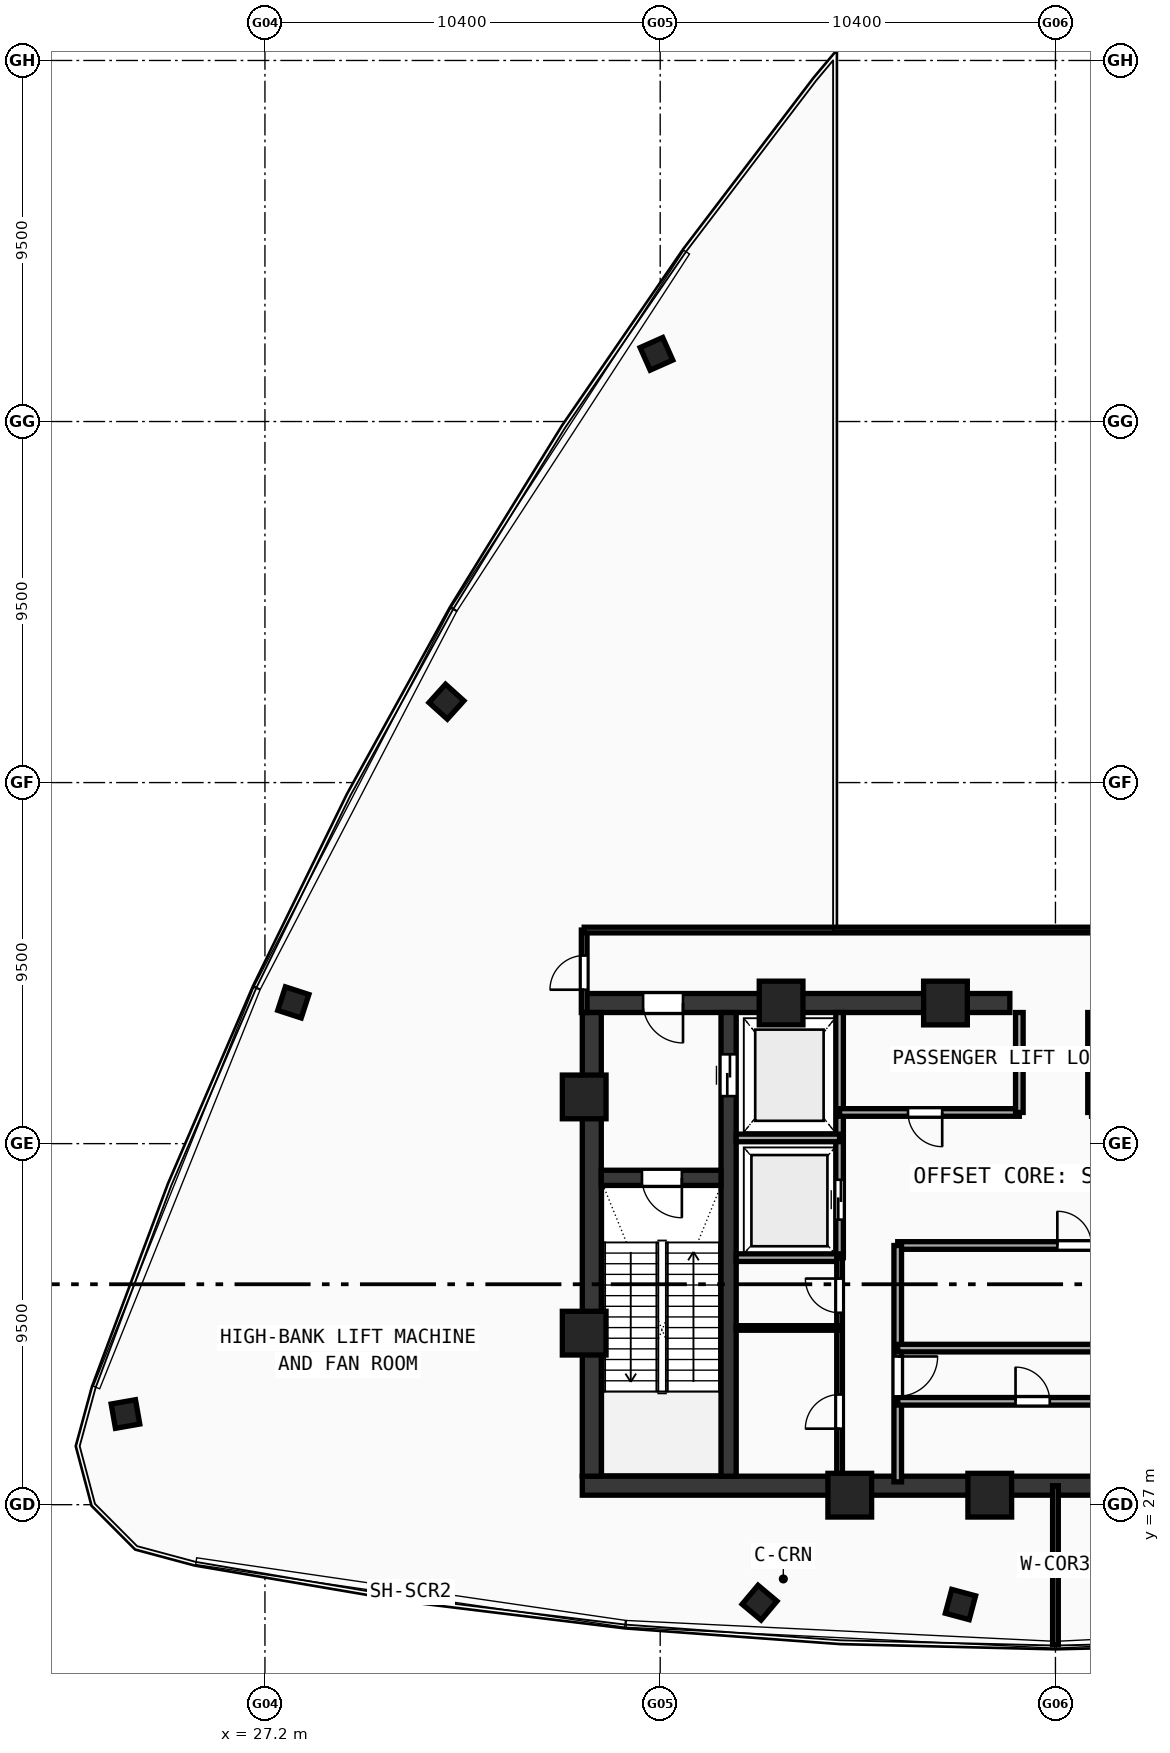
"""IFC4 building model, lengths in metres.
Left out: names, types, materials, properties, quantities, classifications, styles, units other than length and angle.
Written with IfcOpenShell. Run it as: python <this file> out.ifc"""

import sys

from ifc_helpers import new_model, si_unit, direction, frame, frame_2d, origin, origin_with_axes, origin_2d, place, context, subcontext, project, spatial, rectangle, hollow_rectangle, extrude, source, transform, mapped, element, fill, save


model = new_model("IFC4")
c1 = context("Model", 3, precision=1e-05, world=origin(), true_north=direction((0.0, 1.0)))
c2 = subcontext(c1, "Body", "Model", "MODEL_VIEW")
j1 = project(units=[si_unit("LENGTHUNIT", "METRE"), si_unit("PLANEANGLEUNIT", "RADIAN")], contexts=[c1])
p1 = place(None, origin())
s1 = spatial("IfcSite", under=j1, at=p1, CompositionType="ELEMENT")
p2 = place(p1, origin())
s2 = spatial("IfcBuilding", under=s1, at=p2, CompositionType="ELEMENT")
p3 = place(p2, frame((0.0, 0.0, 376.76)))
s3 = spatial("IfcBuildingStorey", under=s2, at=p3, CompositionType="ELEMENT", Elevation=376.76)
p4 = place(p3, frame((35.55, 27.5, 0.0), z_axis=(0.0, 0.0, 1.0), x_axis=(1.0, 0.0, 0.0)))
e1 = element("IfcWall", 1, at=p4, inside=s3, PredefinedType="SHEAR", context=c2, shape_type="SweptSolid", body=[
    extrude(rectangle(XDim=24.9, YDim=0.5, at=frame_2d((12.45, 0.0))), origin(), (0.0, 0.0, 1.0), 4.72),
])
p5 = place(p3, frame((35.55, 40.2, 0.0), z_axis=(0.0, 0.0, 1.0), x_axis=(1.0, 0.0, 0.0)))
e2 = element("IfcWall", 2, at=p5, inside=s3, PredefinedType="SHEAR", context=c2, shape_type="SweptSolid", body=[
    extrude(rectangle(XDim=11.25, YDim=0.5, at=frame_2d((5.625, 0.0))), origin(), (0.0, 0.0, 1.0), 4.72),
])
p6 = place(p5, frame((1.6, 0.0, 0.0)))
e3 = element("IfcOpeningElement", 3, at=p6, cuts=e2, PredefinedType="OPENING", context=c2, shape_type="SweptSolid", body=[
    extrude(rectangle(XDim=1.05, YDim=2.1, at=frame_2d((0.525, 1.05))), frame((0.0, 0.26, 0.0), z_axis=(0.0, -1.0, 0.0), x_axis=(1.0, 0.0, 0.0)), (0.0, 0.0, 1.0), 0.52),
])
p7 = place(p3, frame((35.8, 27.75, 0.0), z_axis=(0.0, 0.0, 1.0), x_axis=(0.0, 1.0, 0.0)))
e4 = element("IfcWall", 4, at=p7, inside=s3, PredefinedType="SHEAR", context=c2, shape_type="SweptSolid", body=[
    extrude(rectangle(XDim=12.2, YDim=0.5, at=frame_2d((6.1, 0.0))), origin(), (0.0, 0.0, 1.0), 4.72),
])
p8 = place(p3, frame((39.4, 27.75, 0.0), z_axis=(0.0, 0.0, 1.0), x_axis=(0.0, 1.0, 0.0)))
e5 = element("IfcWall", 5, at=p8, inside=s3, PredefinedType="SHEAR", context=c2, shape_type="SweptSolid", body=[
    extrude(rectangle(XDim=12.2, YDim=0.4, at=frame_2d((6.1, 0.0))), origin(), (0.0, 0.0, 1.0), 4.72),
])
p9 = place(p8, frame((10.0, 0.0, 0.0)))
e6 = element("IfcOpeningElement", 6, at=p9, cuts=e5, PredefinedType="OPENING", context=c2, shape_type="SweptSolid", body=[
    extrude(rectangle(XDim=1.1, YDim=2.1, at=frame_2d((0.55, 1.05))), frame((0.0, 0.21, 0.0), z_axis=(0.0, -1.0, 0.0), x_axis=(1.0, 0.0, 0.0)), (0.0, 0.0, 1.0), 0.42),
])
p10 = place(p3, frame((36.05, 35.6, 0.0), z_axis=(0.0, 0.0, 1.0), x_axis=(1.0, 0.0, 0.0)))
e7 = element("IfcWall", 7, at=p10, inside=s3, PredefinedType="SHEAR", context=c2, shape_type="SweptSolid", body=[
    extrude(rectangle(XDim=3.15, YDim=0.4, at=frame_2d((1.575, 0.0))), origin(), (0.0, 0.0, 1.0), 4.72),
])
p11 = place(p10, frame((1.07, 0.0, 0.0)))
e8 = element("IfcOpeningElement", 8, at=p11, cuts=e7, PredefinedType="OPENING", context=c2, shape_type="SweptSolid", body=[
    extrude(rectangle(XDim=1.05, YDim=2.1, at=frame_2d((0.525, 1.05))), frame((0.0, 0.21, 0.0), z_axis=(0.0, -1.0, 0.0), x_axis=(1.0, 0.0, 0.0)), (0.0, 0.0, 1.0), 0.42),
])
m1 = source(origin(), c2, "Body", "SweptSolid", [
    extrude(hollow_rectangle(XDim=1.15, YDim=1.15, WallThickness=0.048, at=origin_2d()), origin(), (0.0, 0.0, 1.0), 5.0),
])
for number, where, z_axis, x_axis in (
    (9, (42.588, 27.25, -0.28), (0.0, 0.0, 1.0), (1.0, 0.0, 0.0)),
    (10, (46.272, 27.25, -0.28), (0.0, 0.0, 1.0), (1.0, 0.0, 0.0)),
    (11, (45.106, 40.2, -0.28), (0.0, 0.0, 1.0), (1.0, 0.0, 0.0)),
    (12, (40.781, 40.2, -0.28), (0.0, 0.0, 1.0), (1.0, 0.0, 0.0)),
    (13, (35.6, 37.729, -0.28), (0.0, 0.0, 1.0), (1.0, 0.0, 0.0)),
    (14, (35.6, 31.513, -0.28), (0.0, 0.0, 1.0), (1.0, 0.0, 0.0)),
):
    element("IfcColumn", number, at=place(p3, frame(where, z_axis=z_axis, x_axis=x_axis)), inside=s3, PredefinedType="COLUMN", context=c2, shape_type="MappedRepresentation", body=[
        mapped(m1, transform((0.0, 0.0, 0.0), scale=1.0)),
    ])
m2 = source(origin(), c2, "Body", "SweptSolid", [
    extrude(hollow_rectangle(XDim=0.65, YDim=0.65, WallThickness=0.024, at=origin_2d()), origin(), (0.0, 0.0, 1.0), 5.0),
])
for number, where, z_axis, x_axis in (
    (15, (40.215, 24.422, -0.28), (0.0, 0.0, 1.0), (0.766, -0.643, 0.0)),
    (16, (45.501, 24.373, -0.28), (0.0, 0.0, 1.0), (0.966, -0.259, 0.0)),
    (17, (37.501, 57.281, -0.28), (0.0, 0.0, 1.0), (-0.914, -0.407, 0.0)),
    (18, (31.975, 48.129, -0.28), (0.0, 0.0, 1.0), (-0.669, -0.743, 0.0)),
    (19, (27.947, 40.216, -0.28), (0.0, 0.0, 1.0), (-0.309, -0.951, 0.0)),
    (20, (23.53, 29.385, -0.28), (0.0, 0.0, 1.0), (0.174, -0.985, 0.0)),
):
    element("IfcColumn", number, at=place(p3, frame(where, z_axis=z_axis, x_axis=x_axis)), inside=s3, PredefinedType="COLUMN", context=c2, shape_type="MappedRepresentation", body=[
        mapped(m2, transform((0.0, 0.0, 0.0), scale=1.0)),
    ])
p12 = place(p3, frame((42.32, 33.5, 0.0), z_axis=(0.0, 0.0, 1.0), x_axis=(0.0, 1.0, 0.0)))
e21 = element("IfcWall", 21, at=p12, inside=s3, PredefinedType="SOLIDWALL", context=c2, shape_type="SweptSolid", body=[
    extrude(rectangle(XDim=6.45, YDim=0.2, at=frame_2d((3.225, 0.0))), origin(), (0.0, 0.0, 1.0), 4.72),
])
p13 = place(p12, frame((1.0, 0.0, 0.0)))
e22 = element("IfcOpeningElement", 22, at=p13, cuts=e21, PredefinedType="OPENING", context=c2, shape_type="SweptSolid", body=[
    extrude(rectangle(XDim=1.05, YDim=2.1, at=frame_2d((0.525, 1.05))), frame((0.0, 0.11, 0.0), z_axis=(0.0, -1.0, 0.0), x_axis=(1.0, 0.0, 0.0)), (0.0, 0.0, 1.0), 0.22),
])
for number, where, z_axis, x_axis in (
    (23, (39.6, 36.65, 0.0), (0.0, 0.0, 1.0), (1.0, 0.0, 0.0)),
    (24, (39.6, 33.5, 0.0), (0.0, 0.0, 1.0), (1.0, 0.0, 0.0)),
):
    element("IfcWall", number, at=place(p3, frame(where, z_axis=z_axis, x_axis=x_axis)), inside=s3, PredefinedType="SOLIDWALL", context=c2, shape_type="SweptSolid", body=[
        extrude(rectangle(XDim=2.72, YDim=0.2, at=frame_2d((1.36, 0.0))), origin(), (0.0, 0.0, 1.0), 4.72),
    ])
p14 = place(p3, frame((42.32, 37.32, 0.0), z_axis=(0.0, 0.0, 1.0), x_axis=(1.0, 0.0, 0.0)))
e25 = element("IfcWall", 25, at=p14, inside=s3, PredefinedType="SOLIDWALL", context=c2, shape_type="SweptSolid", body=[
    extrude(rectangle(XDim=4.73, YDim=0.2, at=frame_2d((2.365, 0.0))), origin(), (0.0, 0.0, 1.0), 4.72),
])
p15 = place(p14, frame((1.8, 0.0, 0.0)))
e26 = element("IfcOpeningElement", 26, at=p15, cuts=e25, PredefinedType="OPENING", context=c2, shape_type="SweptSolid", body=[
    extrude(rectangle(XDim=0.9, YDim=2.1, at=frame_2d((0.45, 1.05))), frame((0.0, 0.11, 0.0), z_axis=(0.0, -1.0, 0.0), x_axis=(1.0, 0.0, 0.0)), (0.0, 0.0, 1.0), 0.22),
])
for number, where, z_axis, x_axis in (
    (27, (47.05, 37.32, 0.0), (0.0, 0.0, 1.0), (0.0, 1.0, 0.0)),
    (28, (48.95, 37.32, 0.0), (0.0, 0.0, 1.0), (0.0, 1.0, 0.0)),
):
    element("IfcWall", number, at=place(p3, frame(where, z_axis=z_axis, x_axis=x_axis)), inside=s3, PredefinedType="SOLIDWALL", context=c2, shape_type="SweptSolid", body=[
        extrude(rectangle(XDim=2.63, YDim=0.2, at=frame_2d((1.315, 0.0))), origin(), (0.0, 0.0, 1.0), 4.72),
    ])
p16 = place(p3, frame((43.85, 33.82, 0.0), z_axis=(0.0, 0.0, 1.0), x_axis=(1.0, 0.0, 0.0)))
e29 = element("IfcWall", 29, at=p16, inside=s3, PredefinedType="SOLIDWALL", context=c2, shape_type="SweptSolid", body=[
    extrude(rectangle(XDim=9.83, YDim=0.2, at=frame_2d((4.915, 0.0))), origin(), (0.0, 0.0, 1.0), 4.72),
])
p17 = place(p16, frame((4.2, 0.0, 0.0)))
e30 = element("IfcOpeningElement", 30, at=p17, cuts=e29, PredefinedType="OPENING", context=c2, shape_type="SweptSolid", body=[
    extrude(rectangle(XDim=0.9, YDim=2.1, at=frame_2d((0.45, 1.05))), frame((0.0, 0.11, 0.0), z_axis=(0.0, -1.0, 0.0), x_axis=(1.0, 0.0, 0.0)), (0.0, 0.0, 1.0), 0.22),
])
p18 = place(p3, frame((43.85, 27.6, 0.0), z_axis=(0.0, 0.0, 1.0), x_axis=(0.0, 1.0, 0.0)))
e31 = element("IfcWall", 31, at=p18, inside=s3, PredefinedType="SOLIDWALL", context=c2, shape_type="SweptSolid", body=[
    extrude(rectangle(XDim=6.22, YDim=0.2, at=frame_2d((3.11, 0.0))), origin(), (0.0, 0.0, 1.0), 4.72),
])
p19 = place(p18, frame((2.25, 0.0, 0.0)))
e32 = element("IfcOpeningElement", 32, at=p19, cuts=e31, PredefinedType="OPENING", context=c2, shape_type="SweptSolid", body=[
    extrude(rectangle(XDim=1.05, YDim=2.1, at=frame_2d((0.525, 1.05))), frame((0.0, 0.11, 0.0), z_axis=(0.0, -1.0, 0.0), x_axis=(1.0, 0.0, 0.0)), (0.0, 0.0, 1.0), 0.22),
])
p20 = place(p3, frame((43.85, 29.72, 0.0), z_axis=(0.0, 0.0, 1.0), x_axis=(1.0, 0.0, 0.0)))
e33 = element("IfcWall", 33, at=p20, inside=s3, PredefinedType="SOLIDWALL", context=c2, shape_type="SweptSolid", body=[
    extrude(rectangle(XDim=7.2, YDim=0.2, at=frame_2d((3.6, 0.0))), origin(), (0.0, 0.0, 1.0), 4.72),
])
p21 = place(p20, frame((3.1, 0.0, 0.0)))
e34 = element("IfcOpeningElement", 34, at=p21, cuts=e33, PredefinedType="OPENING", context=c2, shape_type="SweptSolid", body=[
    extrude(rectangle(XDim=0.9, YDim=2.1, at=frame_2d((0.45, 1.05))), frame((0.0, 0.11, 0.0), z_axis=(0.0, -1.0, 0.0), x_axis=(1.0, 0.0, 0.0)), (0.0, 0.0, 1.0), 0.22),
])
p22 = place(p3, frame((43.85, 31.12, 0.0), z_axis=(0.0, 0.0, 1.0), x_axis=(1.0, 0.0, 0.0)))
e35 = element("IfcWall", 35, at=p22, inside=s3, PredefinedType="SOLIDWALL", context=c2, shape_type="SweptSolid", body=[
    extrude(rectangle(XDim=9.83, YDim=0.2, at=frame_2d((4.915, 0.0))), origin(), (0.0, 0.0, 1.0), 4.72),
])
p23 = place(p3, frame((42.32, 27.6, 0.0), z_axis=(0.0, 0.0, 1.0), x_axis=(0.0, 1.0, 0.0)))
e36 = element("IfcWall", 36, at=p23, inside=s3, PredefinedType="PARTITIONING", context=c2, shape_type="SweptSolid", body=[
    extrude(rectangle(XDim=5.9, YDim=0.15, at=frame_2d((2.95, 0.0))), origin(), (0.0, 0.0, 1.0), 4.72),
])
p24 = place(p23, frame((1.4, 0.0, 0.0)))
e37 = element("IfcOpeningElement", 37, at=p24, cuts=e36, PredefinedType="OPENING", context=c2, shape_type="SweptSolid", body=[
    extrude(rectangle(XDim=0.9, YDim=2.1, at=frame_2d((0.45, 1.05))), frame((0.0, 0.085, 0.0), z_axis=(0.0, -1.0, 0.0), x_axis=(1.0, 0.0, 0.0)), (0.0, 0.0, 1.0), 0.17),
])
p25 = place(p23, frame((4.45, 0.0, 0.0)))
e38 = element("IfcOpeningElement", 38, at=p25, cuts=e36, PredefinedType="OPENING", context=c2, shape_type="SweptSolid", body=[
    extrude(rectangle(XDim=0.9, YDim=2.1, at=frame_2d((0.45, 1.05))), frame((0.0, 0.085, 0.0), z_axis=(0.0, -1.0, 0.0), x_axis=(1.0, 0.0, 0.0)), (0.0, 0.0, 1.0), 0.17),
])
p26 = place(p3, frame((39.6, 31.65, 0.0), z_axis=(0.0, 0.0, 1.0), x_axis=(1.0, 0.0, 0.0)))
e39 = element("IfcWall", 39, at=p26, inside=s3, PredefinedType="PARTITIONING", context=c2, shape_type="SweptSolid", body=[
    extrude(rectangle(XDim=2.72, YDim=0.12, at=frame_2d((1.36, 0.0))), origin(), (0.0, 0.0, 1.0), 4.72),
])
p27 = place(p3, frame((35.6, 39.95, 0.0), z_axis=(0.0, 0.0, 1.0), x_axis=(0.0, 1.0, 0.0)))
e40 = element("IfcWall", 40, at=p27, inside=s3, PredefinedType="PARTITIONING", context=c2, shape_type="SweptSolid", body=[
    extrude(rectangle(XDim=2.17, YDim=0.15, at=frame_2d((1.085, 0.0))), origin(), (0.0, 0.0, 1.0), 4.37),
])
p28 = place(p27, frame((0.6, 0.0, 0.0)))
e41 = element("IfcOpeningElement", 41, at=p28, cuts=e40, PredefinedType="OPENING", context=c2, shape_type="SweptSolid", body=[
    extrude(rectangle(XDim=0.9, YDim=2.1, at=frame_2d((0.45, 1.05))), frame((0.0, 0.085, 0.0), z_axis=(0.0, -1.0, 0.0), x_axis=(1.0, 0.0, 0.0)), (0.0, 0.0, 1.0), 0.17),
])
p29 = place(p3, frame((48.0, 23.314, 0.0), z_axis=(0.0, 0.0, 1.0), x_axis=(0.0, 1.0, 0.0)))
e42 = element("IfcWall", 42, at=p29, inside=s3, PredefinedType="PARTITIONING", context=c2, shape_type="SweptSolid", body=[
    extrude(rectangle(XDim=4.186, YDim=0.15, at=frame_2d((2.093, 0.0))), origin(), (0.0, 0.0, 1.0), 4.12),
])
p30 = place(p3, frame((35.6, 42.12, 0.0), z_axis=(0.0, 0.0, 1.0), x_axis=(1.0, 0.0, 0.0)))
e43 = element("IfcWall", 43, at=p30, inside=s3, PredefinedType="PARTITIONING", context=c2, shape_type="SweptSolid", body=[
    extrude(rectangle(XDim=26.65, YDim=0.15, at=frame_2d((13.325, 0.0))), origin(), (0.0, 0.0, 1.0), 4.12),
])
m3 = source(origin(), c2, "Body", "SweptSolid", [
    extrude(rectangle(XDim=1.05, YDim=2.1, at=frame_2d((0.525, 1.05))), frame((0.0, 0.025, 0.0), z_axis=(0.0, -1.0, 0.0), x_axis=(1.0, 0.0, 0.0)), (0.0, 0.0, 1.0), 0.05),
])
p31 = place(p11, frame((1.05, 0.0, 0.0), z_axis=(0.0, 0.0, 1.0), x_axis=(-1.0, 0.0, 0.0)))
e44 = element("IfcDoor", 44, at=p31, inside=s3, OperationType="SINGLE_SWING_LEFT", PredefinedType="DOOR", context=c2, shape_type="MappedRepresentation", body=[
    mapped(m3, transform((0.0, 0.0, 0.0), scale=1.0)),
])
fill(e8, e44)
p32 = place(p6, frame((1.05, 0.0, 0.0), z_axis=(0.0, 0.0, 1.0), x_axis=(-1.0, 0.0, 0.0)))
e45 = element("IfcDoor", 45, at=p32, inside=s3, OperationType="SINGLE_SWING_LEFT", PredefinedType="DOOR", context=c2, shape_type="MappedRepresentation", body=[
    mapped(m3, transform((0.0, 0.0, 0.0), scale=1.0)),
])
fill(e3, e45)
m4 = source(origin(), c2, "Body", "SweptSolid", [
    extrude(rectangle(XDim=1.1, YDim=2.1, at=frame_2d((0.55, 1.05))), frame((0.0, 0.025, 0.0), z_axis=(0.0, -1.0, 0.0), x_axis=(1.0, 0.0, 0.0)), (0.0, 0.0, 1.0), 0.05),
])
p33 = place(p9, frame((1.1, 0.0, 0.0), z_axis=(0.0, 0.0, 1.0), x_axis=(-1.0, 0.0, 0.0)))
e46 = element("IfcDoor", 46, at=p33, inside=s3, OperationType="DOUBLE_DOOR_SLIDING", PredefinedType="DOOR", context=c2, shape_type="MappedRepresentation", body=[
    mapped(m4, transform((0.0, 0.0, 0.0), scale=1.0)),
])
fill(e6, e46)
p34 = place(p13, origin_with_axes())
e47 = element("IfcDoor", 47, at=p34, inside=s3, OperationType="DOUBLE_DOOR_SLIDING", PredefinedType="DOOR", context=c2, shape_type="MappedRepresentation", body=[
    mapped(m3, transform((0.0, 0.0, 0.0), scale=1.0)),
])
fill(e22, e47)
m5 = source(origin(), c2, "Body", "SweptSolid", [
    extrude(rectangle(XDim=0.9, YDim=2.1, at=frame_2d((0.45, 1.05))), frame((0.0, 0.025, 0.0), z_axis=(0.0, -1.0, 0.0), x_axis=(1.0, 0.0, 0.0)), (0.0, 0.0, 1.0), 0.05),
])
p35 = place(p15, frame((0.9, 0.0, 0.0), z_axis=(0.0, 0.0, 1.0), x_axis=(-1.0, 0.0, 0.0)))
e48 = element("IfcDoor", 48, at=p35, inside=s3, OperationType="SINGLE_SWING_LEFT", PredefinedType="DOOR", context=c2, shape_type="MappedRepresentation", body=[
    mapped(m5, transform((0.0, 0.0, 0.0), scale=1.0)),
])
fill(e26, e48)
p36 = place(p17, origin_with_axes())
e49 = element("IfcDoor", 49, at=p36, inside=s3, OperationType="SINGLE_SWING_LEFT", PredefinedType="DOOR", context=c2, shape_type="MappedRepresentation", body=[
    mapped(m5, transform((0.0, 0.0, 0.0), scale=1.0)),
])
fill(e30, e49)
p37 = place(p19, frame((1.05, 0.0, 0.0), z_axis=(0.0, 0.0, 1.0), x_axis=(-1.0, 0.0, 0.0)))
e50 = element("IfcDoor", 50, at=p37, inside=s3, OperationType="SINGLE_SWING_LEFT", PredefinedType="DOOR", context=c2, shape_type="MappedRepresentation", body=[
    mapped(m3, transform((0.0, 0.0, 0.0), scale=1.0)),
])
fill(e32, e50)
p38 = place(p21, origin_with_axes())
e51 = element("IfcDoor", 51, at=p38, inside=s3, OperationType="SINGLE_SWING_LEFT", PredefinedType="DOOR", context=c2, shape_type="MappedRepresentation", body=[
    mapped(m5, transform((0.0, 0.0, 0.0), scale=1.0)),
])
fill(e34, e51)
p39 = place(p24, origin_with_axes())
e52 = element("IfcDoor", 52, at=p39, inside=s3, OperationType="SINGLE_SWING_LEFT", PredefinedType="DOOR", context=c2, shape_type="MappedRepresentation", body=[
    mapped(m5, transform((0.0, 0.0, 0.0), scale=1.0)),
])
fill(e37, e52)
p40 = place(p25, origin_with_axes())
e53 = element("IfcDoor", 53, at=p40, inside=s3, OperationType="SINGLE_SWING_RIGHT", PredefinedType="DOOR", context=c2, shape_type="MappedRepresentation", body=[
    mapped(m5, transform((0.0, 0.0, 0.0), scale=1.0)),
])
fill(e38, e53)
p41 = place(p28, origin_with_axes())
e54 = element("IfcDoor", 54, at=p41, inside=s3, OperationType="SINGLE_SWING_LEFT", PredefinedType="DOOR", context=c2, shape_type="MappedRepresentation", body=[
    mapped(m5, transform((0.0, 0.0, 0.0), scale=1.0)),
])
fill(e41, e54)
save(model, sys.argv[1])
